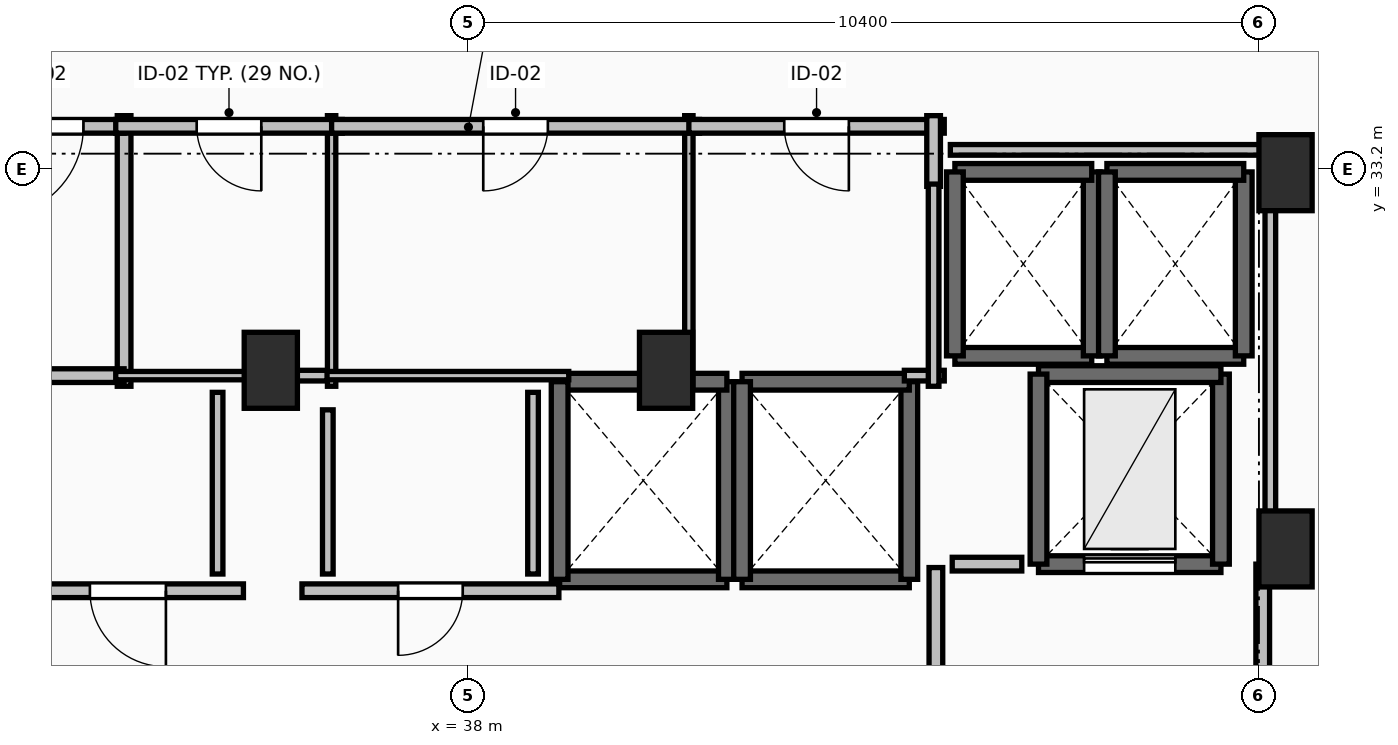
"""IFC4 building model, lengths in metres.
Left out: names, types, materials, properties, quantities, classifications, styles, units other than length and angle.
Written with IfcOpenShell. Run it as: python <this file> out.ifc"""

import sys

from ifc_helpers import new_model, si_unit, direction, frame, frame_2d, origin, origin_2d, place, context, subcontext, project, spatial, rectangle, extrude, element, fill, save


model = new_model("IFC4")
c1 = context("Model", 3, precision=1e-05, world=origin(), true_north=direction((0.0, 1.0)))
c2 = subcontext(c1, "Body", "Model", "MODEL_VIEW")
j1 = project(units=[si_unit("LENGTHUNIT", "METRE"), si_unit("PLANEANGLEUNIT", "RADIAN")], contexts=[c1])
p1 = place(None, origin())
s1 = spatial("IfcSite", under=j1, at=p1, CompositionType="ELEMENT")
p2 = place(p1, origin())
s2 = spatial("IfcBuilding", under=s1, at=p2, CompositionType="ELEMENT")
p3 = place(p2, frame((0.0, 0.0, 200.1)))
s3 = spatial("IfcBuildingStorey", under=s2, at=p3, CompositionType="ELEMENT", Elevation=200.1)
for number, where, z_axis, x_axis in (
    (1, (48.75, 33.15, 0.0), (0.0, 0.0, 1.0), (1.0, 0.0, 0.0)),
    (2, (48.75, 28.2, 0.0), (0.0, 0.0, 1.0), (1.0, 0.0, 0.0)),
    (3, (35.4, 30.55, 0.0), (0.0, 0.0, 1.0), (1.0, 0.0, 0.0)),
    (4, (40.6, 30.55, 0.0), (0.0, 0.0, 1.0), (1.0, 0.0, 0.0)),
):
    element("IfcColumn", number, at=place(p3, frame(where, z_axis=z_axis, x_axis=x_axis)), inside=s3, PredefinedType="PILASTER", context=c2, shape_type="SweptSolid", body=[
        extrude(rectangle(XDim=0.7, YDim=1.0, at=origin_2d()), origin(), (0.0, 0.0, 1.0), 3.55),
    ])
p4 = place(p3, frame((39.2, 27.8, 0.0), z_axis=(0.0, 0.0, 1.0), x_axis=(1.0, 0.0, 0.0)))
e5 = element("IfcWall", 5, at=p4, inside=s3, PredefinedType="SOLIDWALL", context=c2, shape_type="SweptSolid", body=[
    extrude(rectangle(XDim=2.2, YDim=0.22, at=frame_2d((1.1, 0.0))), origin(), (0.0, 0.0, 1.0), 3.29),
])
p5 = place(p3, frame((41.4, 27.8, 0.0), z_axis=(0.0, 0.0, 1.0), x_axis=(0.0, 1.0, 0.0)))
e6 = element("IfcWall", 6, at=p5, inside=s3, PredefinedType="SOLIDWALL", context=c2, shape_type="SweptSolid", body=[
    extrude(rectangle(XDim=2.6, YDim=0.22, at=frame_2d((1.3, 0.0))), origin(), (0.0, 0.0, 1.0), 3.29),
])
p6 = place(p3, frame((41.4, 30.4, 0.0), z_axis=(0.0, 0.0, 1.0), x_axis=(-1.0, 0.0, 0.0)))
e7 = element("IfcWall", 7, at=p6, inside=s3, PredefinedType="SOLIDWALL", context=c2, shape_type="SweptSolid", body=[
    extrude(rectangle(XDim=2.2, YDim=0.22, at=frame_2d((1.1, 0.0))), origin(), (0.0, 0.0, 1.0), 3.29),
])
p7 = place(p3, frame((39.2, 30.4, 0.0), z_axis=(0.0, 0.0, 1.0), x_axis=(0.0, -1.0, 0.0)))
e8 = element("IfcWall", 8, at=p7, inside=s3, PredefinedType="SOLIDWALL", context=c2, shape_type="SweptSolid", body=[
    extrude(rectangle(XDim=2.6, YDim=0.22, at=frame_2d((1.3, 0.0))), origin(), (0.0, 0.0, 1.0), 3.29),
])
p8 = place(p3, frame((41.6, 27.8, 0.0), z_axis=(0.0, 0.0, 1.0), x_axis=(1.0, 0.0, 0.0)))
e9 = element("IfcWall", 9, at=p8, inside=s3, PredefinedType="SOLIDWALL", context=c2, shape_type="SweptSolid", body=[
    extrude(rectangle(XDim=2.2, YDim=0.22, at=frame_2d((1.1, 0.0))), origin(), (0.0, 0.0, 1.0), 3.29),
])
p9 = place(p3, frame((43.8, 27.8, 0.0), z_axis=(0.0, 0.0, 1.0), x_axis=(0.0, 1.0, 0.0)))
e10 = element("IfcWall", 10, at=p9, inside=s3, PredefinedType="SOLIDWALL", context=c2, shape_type="SweptSolid", body=[
    extrude(rectangle(XDim=2.6, YDim=0.22, at=frame_2d((1.3, 0.0))), origin(), (0.0, 0.0, 1.0), 3.29),
])
p10 = place(p3, frame((43.8, 30.4, 0.0), z_axis=(0.0, 0.0, 1.0), x_axis=(-1.0, 0.0, 0.0)))
e11 = element("IfcWall", 11, at=p10, inside=s3, PredefinedType="SOLIDWALL", context=c2, shape_type="SweptSolid", body=[
    extrude(rectangle(XDim=2.2, YDim=0.22, at=frame_2d((1.1, 0.0))), origin(), (0.0, 0.0, 1.0), 3.29),
])
p11 = place(p3, frame((41.6, 30.4, 0.0), z_axis=(0.0, 0.0, 1.0), x_axis=(0.0, -1.0, 0.0)))
e12 = element("IfcWall", 12, at=p11, inside=s3, PredefinedType="SOLIDWALL", context=c2, shape_type="SweptSolid", body=[
    extrude(rectangle(XDim=2.6, YDim=0.22, at=frame_2d((1.3, 0.0))), origin(), (0.0, 0.0, 1.0), 3.29),
])
p12 = place(p3, frame((44.4, 30.74, 0.0), z_axis=(0.0, 0.0, 1.0), x_axis=(1.0, 0.0, 0.0)))
e13 = element("IfcWall", 13, at=p12, inside=s3, PredefinedType="SOLIDWALL", context=c2, shape_type="SweptSolid", body=[
    extrude(rectangle(XDim=1.8, YDim=0.22, at=frame_2d((0.9, 0.0))), origin(), (0.0, 0.0, 1.0), 3.29),
])
p13 = place(p3, frame((46.2, 30.74, 0.0), z_axis=(0.0, 0.0, 1.0), x_axis=(0.0, 1.0, 0.0)))
e14 = element("IfcWall", 14, at=p13, inside=s3, PredefinedType="SOLIDWALL", context=c2, shape_type="SweptSolid", body=[
    extrude(rectangle(XDim=2.42, YDim=0.22, at=frame_2d((1.21, 0.0))), origin(), (0.0, 0.0, 1.0), 3.29),
])
p14 = place(p3, frame((46.2, 33.16, 0.0), z_axis=(0.0, 0.0, 1.0), x_axis=(-1.0, 0.0, 0.0)))
e15 = element("IfcWall", 15, at=p14, inside=s3, PredefinedType="SOLIDWALL", context=c2, shape_type="SweptSolid", body=[
    extrude(rectangle(XDim=1.8, YDim=0.22, at=frame_2d((0.9, 0.0))), origin(), (0.0, 0.0, 1.0), 3.29),
])
p15 = place(p3, frame((44.4, 33.16, 0.0), z_axis=(0.0, 0.0, 1.0), x_axis=(0.0, -1.0, 0.0)))
e16 = element("IfcWall", 16, at=p15, inside=s3, PredefinedType="SOLIDWALL", context=c2, shape_type="SweptSolid", body=[
    extrude(rectangle(XDim=2.42, YDim=0.22, at=frame_2d((1.21, 0.0))), origin(), (0.0, 0.0, 1.0), 3.29),
])
p16 = place(p3, frame((46.4, 30.74, 0.0), z_axis=(0.0, 0.0, 1.0), x_axis=(1.0, 0.0, 0.0)))
e17 = element("IfcWall", 17, at=p16, inside=s3, PredefinedType="SOLIDWALL", context=c2, shape_type="SweptSolid", body=[
    extrude(rectangle(XDim=1.8, YDim=0.22, at=frame_2d((0.9, 0.0))), origin(), (0.0, 0.0, 1.0), 3.29),
])
p17 = place(p3, frame((48.2, 30.74, 0.0), z_axis=(0.0, 0.0, 1.0), x_axis=(0.0, 1.0, 0.0)))
e18 = element("IfcWall", 18, at=p17, inside=s3, PredefinedType="SOLIDWALL", context=c2, shape_type="SweptSolid", body=[
    extrude(rectangle(XDim=2.42, YDim=0.22, at=frame_2d((1.21, 0.0))), origin(), (0.0, 0.0, 1.0), 3.29),
])
p18 = place(p3, frame((48.2, 33.16, 0.0), z_axis=(0.0, 0.0, 1.0), x_axis=(-1.0, 0.0, 0.0)))
e19 = element("IfcWall", 19, at=p18, inside=s3, PredefinedType="SOLIDWALL", context=c2, shape_type="SweptSolid", body=[
    extrude(rectangle(XDim=1.8, YDim=0.22, at=frame_2d((0.9, 0.0))), origin(), (0.0, 0.0, 1.0), 3.29),
])
p19 = place(p3, frame((46.4, 33.16, 0.0), z_axis=(0.0, 0.0, 1.0), x_axis=(0.0, -1.0, 0.0)))
e20 = element("IfcWall", 20, at=p19, inside=s3, PredefinedType="SOLIDWALL", context=c2, shape_type="SweptSolid", body=[
    extrude(rectangle(XDim=2.42, YDim=0.22, at=frame_2d((1.21, 0.0))), origin(), (0.0, 0.0, 1.0), 3.29),
])
p20 = place(p3, frame((45.5, 28.0, 0.0), z_axis=(0.0, 0.0, 1.0), x_axis=(1.0, 0.0, 0.0)))
e21 = element("IfcWall", 21, at=p20, inside=s3, PredefinedType="SHEAR", context=c2, shape_type="SweptSolid", body=[
    extrude(rectangle(XDim=2.4, YDim=0.22, at=frame_2d((1.2, 0.0))), origin(), (0.0, 0.0, 1.0), 3.29),
])
p21 = place(p20, frame((0.6, 0.0, 0.0)))
e22 = element("IfcOpeningElement", 22, at=p21, cuts=e21, PredefinedType="OPENING", context=c2, shape_type="SweptSolid", body=[
    extrude(rectangle(XDim=1.2, YDim=2.2, at=frame_2d((0.6, 1.1))), frame((0.0, 0.125, 0.0), z_axis=(0.0, -1.0, 0.0), x_axis=(1.0, 0.0, 0.0)), (0.0, 0.0, 1.0), 0.25),
])
p22 = place(p3, frame((47.9, 28.0, 0.0), z_axis=(0.0, 0.0, 1.0), x_axis=(0.0, 1.0, 0.0)))
e23 = element("IfcWall", 23, at=p22, inside=s3, PredefinedType="SHEAR", context=c2, shape_type="SweptSolid", body=[
    extrude(rectangle(XDim=2.5, YDim=0.22, at=frame_2d((1.25, 0.0))), origin(), (0.0, 0.0, 1.0), 3.29),
])
p23 = place(p3, frame((47.9, 30.5, 0.0), z_axis=(0.0, 0.0, 1.0), x_axis=(-1.0, 0.0, 0.0)))
e24 = element("IfcWall", 24, at=p23, inside=s3, PredefinedType="SHEAR", context=c2, shape_type="SweptSolid", body=[
    extrude(rectangle(XDim=2.4, YDim=0.22, at=frame_2d((1.2, 0.0))), origin(), (0.0, 0.0, 1.0), 3.29),
])
p24 = place(p3, frame((45.5, 30.5, 0.0), z_axis=(0.0, 0.0, 1.0), x_axis=(0.0, -1.0, 0.0)))
e25 = element("IfcWall", 25, at=p24, inside=s3, PredefinedType="SHEAR", context=c2, shape_type="SweptSolid", body=[
    extrude(rectangle(XDim=2.5, YDim=0.22, at=frame_2d((1.25, 0.0))), origin(), (0.0, 0.0, 1.0), 3.29),
])
p25 = place(p3, frame((44.15, 27.955, 0.0), z_axis=(0.0, 0.0, 1.0), x_axis=(0.0, -1.0, 0.0)))
e26 = element("IfcWall", 26, at=p25, inside=s3, PredefinedType="PARTITIONING", context=c2, shape_type="SweptSolid", body=[
    extrude(rectangle(XDim=3.91, YDim=0.18, at=frame_2d((1.955, 0.0))), origin(), (0.0, 0.0, 1.0), 3.29),
])
p26 = place(p25, frame((1.355, 0.0, 0.0)))
e27 = element("IfcOpeningElement", 27, at=p26, cuts=e26, PredefinedType="OPENING", context=c2, shape_type="SweptSolid", body=[
    extrude(rectangle(XDim=1.2, YDim=2.15, at=frame_2d((0.6, 1.075))), frame((0.0, 0.105, 0.0), z_axis=(0.0, -1.0, 0.0), x_axis=(1.0, 0.0, 0.0)), (0.0, 0.0, 1.0), 0.21),
])
p27 = place(p3, frame((48.45, 23.95, 0.0), z_axis=(0.0, 0.0, 1.0), x_axis=(0.0, 1.0, 0.0)))
e28 = element("IfcWall", 28, at=p27, inside=s3, PredefinedType="PARTITIONING", context=c2, shape_type="SweptSolid", body=[
    extrude(rectangle(XDim=4.05, YDim=0.18, at=frame_2d((2.025, 0.0))), origin(), (0.0, 0.0, 1.0), 3.29),
])
p28 = place(p27, frame((1.425, 0.0, 0.0)))
e29 = element("IfcOpeningElement", 29, at=p28, cuts=e28, PredefinedType="OPENING", context=c2, shape_type="SweptSolid", body=[
    extrude(rectangle(XDim=1.2, YDim=2.15, at=frame_2d((0.6, 1.075))), frame((0.0, 0.105, 0.0), z_axis=(0.0, -1.0, 0.0), x_axis=(1.0, 0.0, 0.0)), (0.0, 0.0, 1.0), 0.21),
])
p29 = place(p3, frame((33.47, 30.34, 0.0), z_axis=(0.0, 0.0, 1.0), x_axis=(0.0, 1.0, 0.0)))
e30 = element("IfcWall", 30, at=p29, inside=s3, PredefinedType="PARTITIONING", context=c2, shape_type="SweptSolid", body=[
    extrude(rectangle(XDim=3.56, YDim=0.18, at=frame_2d((1.78, 0.0))), origin(), (0.0, 0.0, 1.0), 3.29),
])
p30 = place(p3, frame((31.87, 30.48, 0.0), z_axis=(0.0, 0.0, 1.0), x_axis=(1.0, 0.0, 0.0)))
e31 = element("IfcWall", 31, at=p30, inside=s3, PredefinedType="PARTITIONING", context=c2, shape_type="SweptSolid", body=[
    extrude(rectangle(XDim=1.6, YDim=0.18, at=frame_2d((0.8, 0.0))), origin(), (0.0, 0.0, 1.0), 3.29),
])
p31 = place(p3, frame((33.47, 33.76, 0.0), z_axis=(0.0, 0.0, 1.0), x_axis=(-1.0, 0.0, 0.0)))
e32 = element("IfcWall", 32, at=p31, inside=s3, PredefinedType="PARTITIONING", context=c2, shape_type="SweptSolid", body=[
    extrude(rectangle(XDim=2.27, YDim=0.18, at=frame_2d((1.135, 0.0))), origin(), (0.0, 0.0, 1.0), 3.29),
])
p32 = place(p31, frame((0.535, 0.0, 0.0)))
e33 = element("IfcOpeningElement", 33, at=p32, cuts=e32, PredefinedType="OPENING", context=c2, shape_type="SweptSolid", body=[
    extrude(rectangle(XDim=1.2, YDim=2.15, at=frame_2d((0.6, 1.075))), frame((0.0, 0.105, 0.0), z_axis=(0.0, -1.0, 0.0), x_axis=(1.0, 0.0, 0.0)), (0.0, 0.0, 1.0), 0.21),
])
p33 = place(p3, frame((35.04, 27.65, 0.0), z_axis=(0.0, 0.0, 1.0), x_axis=(-1.0, 0.0, 0.0)))
e34 = element("IfcWall", 34, at=p33, inside=s3, PredefinedType="PARTITIONING", context=c2, shape_type="SweptSolid", body=[
    extrude(rectangle(XDim=3.04, YDim=0.18, at=frame_2d((1.52, 0.0))), origin(), (0.0, 0.0, 1.0), 3.29),
])
p34 = place(p33, frame((1.02, 0.0, 0.0)))
e35 = element("IfcOpeningElement", 35, at=p34, cuts=e34, PredefinedType="OPENING", context=c2, shape_type="SweptSolid", body=[
    extrude(rectangle(XDim=1.0, YDim=2.15, at=frame_2d((0.5, 1.075))), frame((0.0, 0.105, 0.0), z_axis=(0.0, -1.0, 0.0), x_axis=(1.0, 0.0, 0.0)), (0.0, 0.0, 1.0), 0.21),
])
p35 = place(p3, frame((39.19, 27.65, 0.0), z_axis=(0.0, 0.0, 1.0), x_axis=(-1.0, 0.0, 0.0)))
e36 = element("IfcWall", 36, at=p35, inside=s3, PredefinedType="PARTITIONING", context=c2, shape_type="SweptSolid", body=[
    extrude(rectangle(XDim=3.38, YDim=0.18, at=frame_2d((1.69, 0.0))), origin(), (0.0, 0.0, 1.0), 3.29),
])
p36 = place(p35, frame((1.265, 0.0, 0.0)))
e37 = element("IfcOpeningElement", 37, at=p36, cuts=e36, PredefinedType="OPENING", context=c2, shape_type="SweptSolid", body=[
    extrude(rectangle(XDim=0.85, YDim=2.1, at=frame_2d((0.425, 1.05))), frame((0.0, 0.105, 0.0), z_axis=(0.0, -1.0, 0.0), x_axis=(1.0, 0.0, 0.0)), (0.0, 0.0, 1.0), 0.21),
])
p37 = place(p3, frame((36.2, 30.34, 0.0), z_axis=(0.0, 0.0, 1.0), x_axis=(0.0, 1.0, 0.0)))
e38 = element("IfcWall", 38, at=p37, inside=s3, PredefinedType="PARTITIONING", context=c2, shape_type="SweptSolid", body=[
    extrude(rectangle(XDim=3.56, YDim=0.11, at=frame_2d((1.78, 0.0))), origin(), (0.0, 0.0, 1.0), 2.482),
])
p38 = place(p3, frame((33.36, 30.48, 0.0), z_axis=(0.0, 0.0, 1.0), x_axis=(1.0, 0.0, 0.0)))
e39 = element("IfcWall", 39, at=p38, inside=s3, PredefinedType="PARTITIONING", context=c2, shape_type="SweptSolid", body=[
    extrude(rectangle(XDim=1.81, YDim=0.11, at=frame_2d((0.905, 0.0))), origin(), (0.0, 0.0, 1.0), 3.29),
])
p39 = place(p3, frame((36.34, 33.76, 0.0), z_axis=(0.0, 0.0, 1.0), x_axis=(-1.0, 0.0, 0.0)))
e40 = element("IfcWall", 40, at=p39, inside=s3, PredefinedType="PARTITIONING", context=c2, shape_type="SweptSolid", body=[
    extrude(rectangle(XDim=2.98, YDim=0.18, at=frame_2d((1.49, 0.0))), origin(), (0.0, 0.0, 1.0), 3.29),
])
p40 = place(p39, frame((1.065, 0.0, 0.0)))
e41 = element("IfcOpeningElement", 41, at=p40, cuts=e40, PredefinedType="OPENING", context=c2, shape_type="SweptSolid", body=[
    extrude(rectangle(XDim=0.85, YDim=2.1, at=frame_2d((0.425, 1.05))), frame((0.0, 0.105, 0.0), z_axis=(0.0, -1.0, 0.0), x_axis=(1.0, 0.0, 0.0)), (0.0, 0.0, 1.0), 0.21),
])
p41 = place(p3, frame((40.9, 30.34, 0.0), z_axis=(0.0, 0.0, 1.0), x_axis=(0.0, 1.0, 0.0)))
e42 = element("IfcWall", 42, at=p41, inside=s3, PredefinedType="PARTITIONING", context=c2, shape_type="SweptSolid", body=[
    extrude(rectangle(XDim=3.56, YDim=0.11, at=frame_2d((1.78, 0.0))), origin(), (0.0, 0.0, 1.0), 3.29),
])
p42 = place(p3, frame((36.11, 30.48, 0.0), z_axis=(0.0, 0.0, 1.0), x_axis=(1.0, 0.0, 0.0)))
e43 = element("IfcWall", 43, at=p42, inside=s3, PredefinedType="PARTITIONING", context=c2, shape_type="SweptSolid", body=[
    extrude(rectangle(XDim=3.21, YDim=0.11, at=frame_2d((1.605, 0.0))), origin(), (0.0, 0.0, 1.0), 2.482),
])
p43 = place(p3, frame((41.04, 33.76, 0.0), z_axis=(0.0, 0.0, 1.0), x_axis=(-1.0, 0.0, 0.0)))
e44 = element("IfcWall", 44, at=p43, inside=s3, PredefinedType="PARTITIONING", context=c2, shape_type="SweptSolid", body=[
    extrude(rectangle(XDim=4.84, YDim=0.18, at=frame_2d((2.42, 0.0))), origin(), (0.0, 0.0, 1.0), 3.29),
])
p44 = place(p43, frame((1.995, 0.0, 0.0)))
e45 = element("IfcOpeningElement", 45, at=p44, cuts=e44, PredefinedType="OPENING", context=c2, shape_type="SweptSolid", body=[
    extrude(rectangle(XDim=0.85, YDim=2.1, at=frame_2d((0.425, 1.05))), frame((0.0, 0.105, 0.0), z_axis=(0.0, -1.0, 0.0), x_axis=(1.0, 0.0, 0.0)), (0.0, 0.0, 1.0), 0.21),
])
p45 = place(p3, frame((44.26, 33.76, 0.0), z_axis=(0.0, 0.0, 1.0), x_axis=(-1.0, 0.0, 0.0)))
e46 = element("IfcWall", 46, at=p45, inside=s3, PredefinedType="PARTITIONING", context=c2, shape_type="SweptSolid", body=[
    extrude(rectangle(XDim=3.36, YDim=0.18, at=frame_2d((1.68, 0.0))), origin(), (0.0, 0.0, 1.0), 3.29),
])
p46 = place(p45, frame((1.255, 0.0, 0.0)))
e47 = element("IfcOpeningElement", 47, at=p46, cuts=e46, PredefinedType="OPENING", context=c2, shape_type="SweptSolid", body=[
    extrude(rectangle(XDim=0.85, YDim=2.1, at=frame_2d((0.425, 1.05))), frame((0.0, 0.105, 0.0), z_axis=(0.0, -1.0, 0.0), x_axis=(1.0, 0.0, 0.0)), (0.0, 0.0, 1.0), 0.21),
])
p47 = place(p3, frame((44.12, 32.97, 0.0), z_axis=(0.0, 0.0, 1.0), x_axis=(0.0, 1.0, 0.0)))
e48 = element("IfcWall", 48, at=p47, inside=s3, PredefinedType="PARTITIONING", context=c2, shape_type="SweptSolid", body=[
    extrude(rectangle(XDim=0.93, YDim=0.18, at=frame_2d((0.465, 0.0))), origin(), (0.0, 0.0, 1.0), 3.29),
])
p48 = place(p3, frame((45.28, 28.0, 0.0), z_axis=(0.0, 0.0, 1.0), x_axis=(-1.0, 0.0, 0.0)))
e49 = element("IfcWall", 49, at=p48, inside=s3, PredefinedType="PARTITIONING", context=c2, shape_type="SweptSolid", body=[
    extrude(rectangle(XDim=0.915, YDim=0.18, at=frame_2d((0.458, 0.0))), origin(), (0.0, 0.0, 1.0), 3.29),
])
p49 = place(p3, frame((35.14, 30.48, 0.0), z_axis=(0.0, 0.0, 1.0), x_axis=(1.0, 0.0, 0.0)))
e50 = element("IfcWall", 50, at=p49, inside=s3, PredefinedType="PARTITIONING", context=c2, shape_type="SweptSolid", body=[
    extrude(rectangle(XDim=1.0, YDim=0.14, at=frame_2d((0.5, 0.0))), origin(), (0.0, 0.0, 1.0), 2.482),
])
p50 = place(p3, frame((43.735, 30.48, 0.0), z_axis=(0.0, 0.0, 1.0), x_axis=(1.0, 0.0, 0.0)))
e51 = element("IfcWall", 51, at=p50, inside=s3, PredefinedType="PARTITIONING", context=c2, shape_type="SweptSolid", body=[
    extrude(rectangle(XDim=0.525, YDim=0.14, at=frame_2d((0.262, 0.0))), origin(), (0.0, 0.0, 1.0), 3.29),
])
p51 = place(p3, frame((44.12, 30.34, 0.0), z_axis=(0.0, 0.0, 1.0), x_axis=(0.0, 1.0, 0.0)))
e52 = element("IfcWall", 52, at=p51, inside=s3, PredefinedType="PARTITIONING", context=c2, shape_type="SweptSolid", body=[
    extrude(rectangle(XDim=2.66, YDim=0.14, at=frame_2d((1.33, 0.0))), origin(), (0.0, 0.0, 1.0), 3.29),
])
p52 = place(p3, frame((34.7, 27.87, 0.0), z_axis=(0.0, 0.0, 1.0), x_axis=(0.0, 1.0, 0.0)))
e53 = element("IfcWall", 53, at=p52, inside=s3, PredefinedType="PARTITIONING", context=c2, shape_type="SweptSolid", body=[
    extrude(rectangle(XDim=2.39, YDim=0.14, at=frame_2d((1.195, 0.0))), origin(), (0.0, 0.0, 1.0), 3.29),
])
p53 = place(p3, frame((36.15, 30.03, 0.0), z_axis=(0.0, 0.0, 1.0), x_axis=(0.0, -1.0, 0.0)))
e54 = element("IfcWall", 54, at=p53, inside=s3, PredefinedType="PARTITIONING", context=c2, shape_type="SweptSolid", body=[
    extrude(rectangle(XDim=2.16, YDim=0.14, at=frame_2d((1.08, 0.0))), origin(), (0.0, 0.0, 1.0), 3.29),
])
p54 = place(p3, frame((38.85, 27.87, 0.0), z_axis=(0.0, 0.0, 1.0), x_axis=(0.0, 1.0, 0.0)))
e55 = element("IfcWall", 55, at=p54, inside=s3, PredefinedType="PARTITIONING", context=c2, shape_type="SweptSolid", body=[
    extrude(rectangle(XDim=2.39, YDim=0.14, at=frame_2d((1.195, 0.0))), origin(), (0.0, 0.0, 1.0), 3.29),
])
p55 = place(p3, frame((48.55, 28.196, 0.0), z_axis=(0.0, 0.0, 1.0), x_axis=(0.0, 1.0, 0.0)))
e56 = element("IfcWall", 56, at=p55, inside=s3, PredefinedType="PARTITIONING", context=c2, shape_type="SweptSolid", body=[
    extrude(rectangle(XDim=5.254, YDim=0.14, at=frame_2d((2.627, 0.0))), origin(), (0.0, 0.0, 1.0), 2.482),
])
p56 = place(p3, frame((48.55, 33.45, 0.0), z_axis=(0.0, 0.0, 1.0), x_axis=(-1.0, 0.0, 0.0)))
e57 = element("IfcWall", 57, at=p56, inside=s3, PredefinedType="PARTITIONING", context=c2, shape_type="SweptSolid", body=[
    extrude(rectangle(XDim=4.21, YDim=0.14, at=frame_2d((2.105, 0.0))), origin(), (0.0, 0.0, 1.0), 2.482),
])
p57 = place(p21, origin())
e58 = element("IfcDoor", 58, at=p57, inside=s3, OperationType="SLIDING_TO_LEFT", PredefinedType="DOOR", context=c2, shape_type="SweptSolid", body=[
    extrude(rectangle(XDim=1.2, YDim=2.2, at=frame_2d((0.6, 1.1))), frame((0.0, 0.025, 0.0), z_axis=(0.0, -1.0, 0.0), x_axis=(1.0, 0.0, 0.0)), (0.0, 0.0, 1.0), 0.05),
])
fill(e22, e58)
p58 = place(p32, origin())
e59 = element("IfcDoor", 59, at=p58, inside=s3, OperationType="SINGLE_SWING_RIGHT", PredefinedType="DOOR", context=c2, shape_type="SweptSolid", body=[
    extrude(rectangle(XDim=1.2, YDim=2.15, at=frame_2d((0.6, 1.075))), frame((0.0, 0.025, 0.0), z_axis=(0.0, -1.0, 0.0), x_axis=(1.0, 0.0, 0.0)), (0.0, 0.0, 1.0), 0.05),
])
fill(e33, e59)
p59 = place(p34, origin())
e60 = element("IfcDoor", 60, at=p59, inside=s3, OperationType="SINGLE_SWING_LEFT", PredefinedType="DOOR", context=c2, shape_type="SweptSolid", body=[
    extrude(rectangle(XDim=1.0, YDim=2.15, at=frame_2d((0.5, 1.075))), frame((0.0, 0.025, 0.0), z_axis=(0.0, -1.0, 0.0), x_axis=(1.0, 0.0, 0.0)), (0.0, 0.0, 1.0), 0.05),
])
fill(e35, e60)
p60 = place(p36, origin())
e61 = element("IfcDoor", 61, at=p60, inside=s3, OperationType="SINGLE_SWING_RIGHT", PredefinedType="DOOR", context=c2, shape_type="SweptSolid", body=[
    extrude(rectangle(XDim=0.85, YDim=2.1, at=frame_2d((0.425, 1.05))), frame((0.0, 0.025, 0.0), z_axis=(0.0, -1.0, 0.0), x_axis=(1.0, 0.0, 0.0)), (0.0, 0.0, 1.0), 0.05),
])
fill(e37, e61)
p61 = place(p40, origin())
e62 = element("IfcDoor", 62, at=p61, inside=s3, OperationType="SINGLE_SWING_LEFT", PredefinedType="DOOR", context=c2, shape_type="SweptSolid", body=[
    extrude(rectangle(XDim=0.85, YDim=2.1, at=frame_2d((0.425, 1.05))), frame((0.0, 0.025, 0.0), z_axis=(0.0, -1.0, 0.0), x_axis=(1.0, 0.0, 0.0)), (0.0, 0.0, 1.0), 0.05),
])
fill(e41, e62)
p62 = place(p44, origin())
e63 = element("IfcDoor", 63, at=p62, inside=s3, OperationType="SINGLE_SWING_RIGHT", PredefinedType="DOOR", context=c2, shape_type="SweptSolid", body=[
    extrude(rectangle(XDim=0.85, YDim=2.1, at=frame_2d((0.425, 1.05))), frame((0.0, 0.025, 0.0), z_axis=(0.0, -1.0, 0.0), x_axis=(1.0, 0.0, 0.0)), (0.0, 0.0, 1.0), 0.05),
])
fill(e45, e63)
p63 = place(p46, origin())
e64 = element("IfcDoor", 64, at=p63, inside=s3, OperationType="SINGLE_SWING_LEFT", PredefinedType="DOOR", context=c2, shape_type="SweptSolid", body=[
    extrude(rectangle(XDim=0.85, YDim=2.1, at=frame_2d((0.425, 1.05))), frame((0.0, 0.025, 0.0), z_axis=(0.0, -1.0, 0.0), x_axis=(1.0, 0.0, 0.0)), (0.0, 0.0, 1.0), 0.05),
])
fill(e47, e64)
save(model, sys.argv[1])
